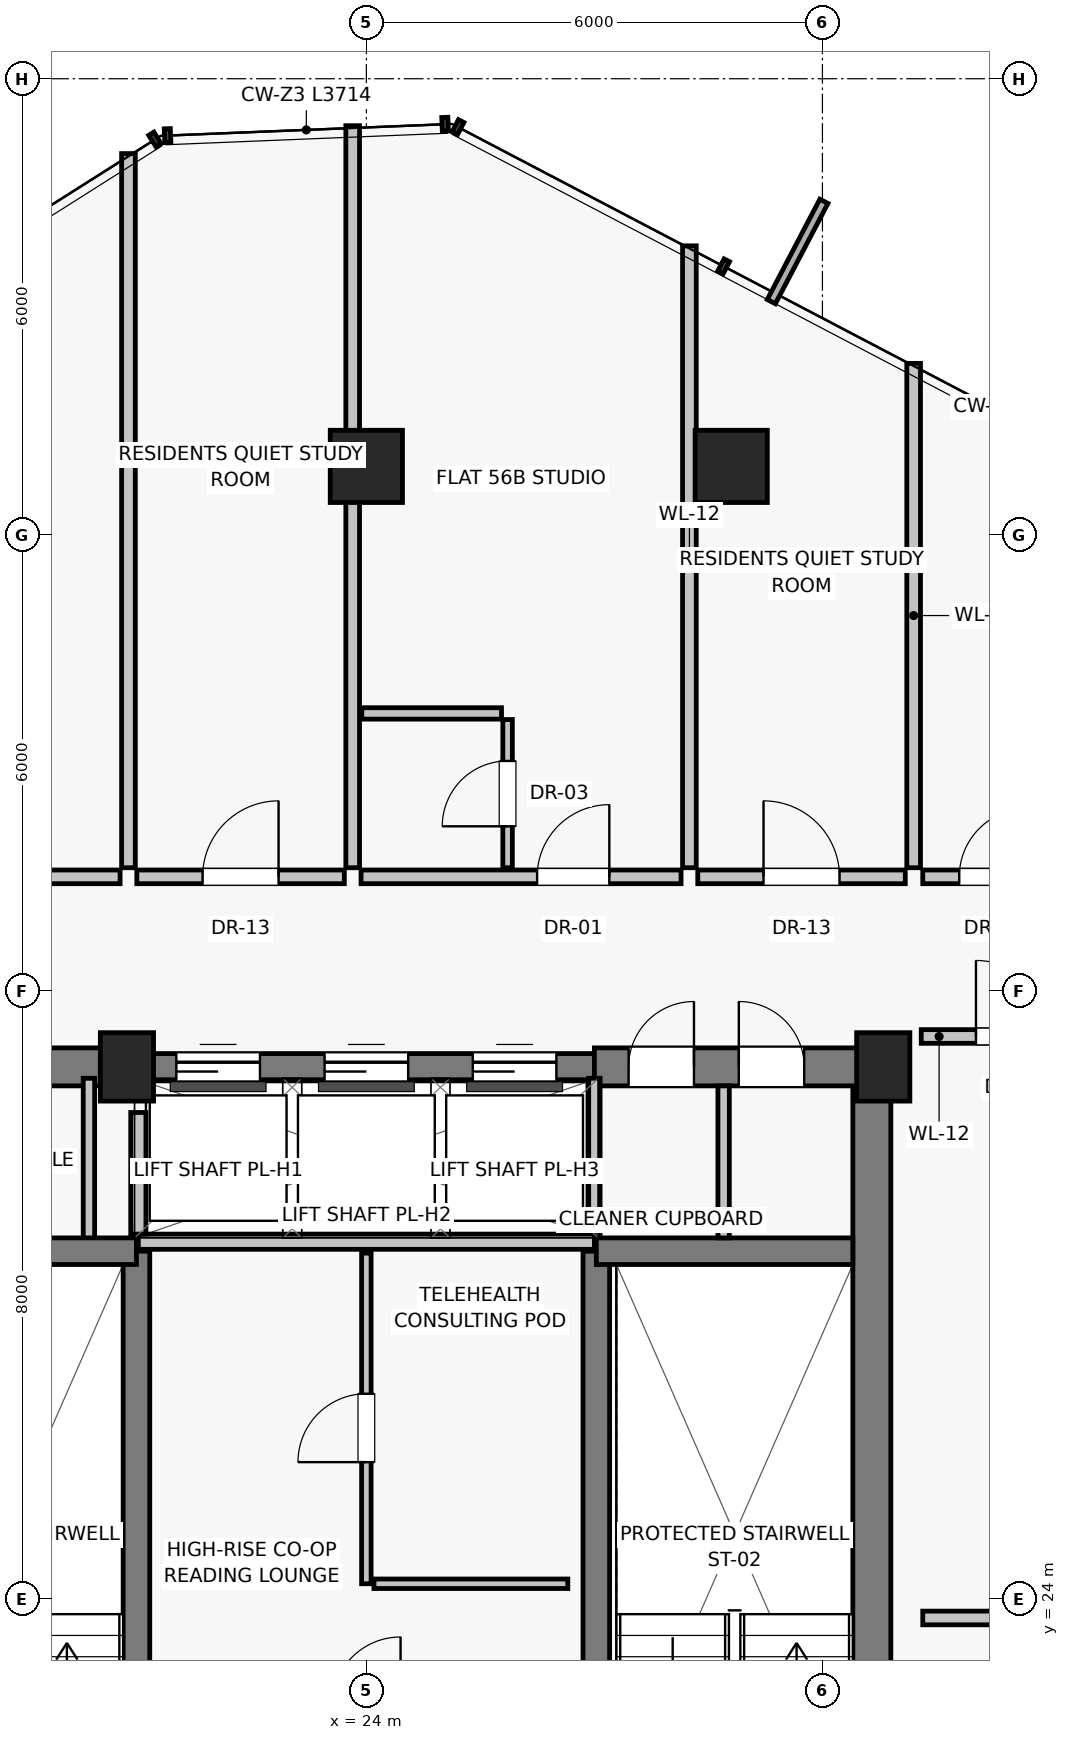
"""IFC4 building model, lengths in metres.
Left out: names, types, materials, properties, quantities, classifications, styles, units other than length and angle.
Written with IfcOpenShell. Run it as: python <this file> out.ifc"""

import sys

from ifc_helpers import new_model, si_unit, direction, frame, frame_2d, origin, origin_2d, place, context, subcontext, project, spatial, rectangle, extrude, source, transform, mapped, element, fill, save


model = new_model("IFC4")
c1 = context("Model", 3, precision=1e-05, world=origin(), true_north=direction((0.0, 1.0)))
c2 = subcontext(c1, "Body", "Model", "MODEL_VIEW")
j1 = project(units=[si_unit("LENGTHUNIT", "METRE"), si_unit("PLANEANGLEUNIT", "RADIAN")], contexts=[c1])
p1 = place(None, origin())
s1 = spatial("IfcSite", under=j1, at=p1, CompositionType="ELEMENT")
p2 = place(p1, origin())
s2 = spatial("IfcBuilding", under=s1, at=p2, CompositionType="ELEMENT")
p3 = place(p2, frame((0.0, 0.0, 198.35)))
s3 = spatial("IfcBuildingStorey", under=s2, at=p3, CompositionType="ELEMENT", Elevation=198.35)
for number, where, z_axis, x_axis in (
    (1, (20.85, 31.0, 0.0), (0.0, 0.0, 1.0), (1.0, 0.0, 0.0)),
    (2, (30.8, 31.0, 0.0), (0.0, 0.0, 1.0), (1.0, 0.0, 0.0)),
):
    element("IfcColumn", number, at=place(p3, frame(where, z_axis=z_axis, x_axis=x_axis)), inside=s3, PredefinedType="PILASTER", context=c2, shape_type="SweptSolid", body=[
        extrude(rectangle(XDim=0.7, YDim=0.9, at=origin_2d()), origin(), (0.0, 0.0, 1.0), 3.25),
    ])
for number, where, z_axis, x_axis in (
    (3, (28.8, 38.9, 0.0), (0.0, 0.0, 1.0), (1.0, 0.0, 0.0)),
    (4, (24.0, 38.9, 0.0), (0.0, 0.0, 1.0), (1.0, 0.0, 0.0)),
):
    element("IfcColumn", number, at=place(p3, frame(where, z_axis=z_axis, x_axis=x_axis)), inside=s3, PredefinedType="COLUMN", context=c2, shape_type="SweptSolid", body=[
        extrude(rectangle(XDim=0.95, YDim=0.95, at=origin_2d()), origin(), (0.0, 0.0, 1.0), 3.25),
    ])
p4 = place(p3, frame((30.65, 16.8, 0.0), z_axis=(0.0, 0.0, 1.0), x_axis=(0.0, 1.0, 0.0)))
e5 = element("IfcWall", 5, at=p4, inside=s3, PredefinedType="SHEAR", context=c2, shape_type="SweptSolid", body=[
    extrude(rectangle(XDim=14.2, YDim=0.5, at=frame_2d((7.1, 0.0))), origin(), (0.0, 0.0, 1.0), 3.015),
])
p5 = place(p3, frame((17.2, 31.0, 0.0), z_axis=(0.0, 0.0, 1.0), x_axis=(1.0, 0.0, 0.0)))
e6 = element("IfcWall", 6, at=p5, inside=s3, PredefinedType="SHEAR", context=c2, shape_type="SweptSolid", body=[
    extrude(rectangle(XDim=3.8, YDim=0.5, at=frame_2d((1.9, 0.0))), origin(), (0.0, 0.0, 1.0), 3.015),
])
p6 = place(p5, frame((1.25, 0.0, 0.0)))
e7 = element("IfcOpeningElement", 7, at=p6, cuts=e6, PredefinedType="OPENING", context=c2, shape_type="SweptSolid", body=[
    extrude(rectangle(XDim=0.86, YDim=2.01, at=frame_2d((0.43, 1.005))), frame((0.0, 0.26, 0.0), z_axis=(0.0, -1.0, 0.0), x_axis=(1.0, 0.0, 0.0)), (0.0, 0.0, 1.0), 0.52),
])
p7 = place(p3, frame((21.0, 31.0, 0.0), z_axis=(0.0, 0.0, 1.0), x_axis=(1.0, 0.0, 0.0)))
e8 = element("IfcWall", 8, at=p7, inside=s3, PredefinedType="SHEAR", context=c2, shape_type="SweptSolid", body=[
    extrude(rectangle(XDim=6.0, YDim=0.35, at=frame_2d((3.0, 0.0))), origin(), (0.0, 0.0, 1.0), 3.015),
])
p8 = place(p7, frame((0.5, 0.0, 0.0)))
e9 = element("IfcOpeningElement", 9, at=p8, cuts=e8, PredefinedType="OPENING", context=c2, shape_type="SweptSolid", body=[
    extrude(rectangle(XDim=1.1, YDim=2.08, at=frame_2d((0.55, 1.04))), frame((0.0, 0.185, 0.0), z_axis=(0.0, -1.0, 0.0), x_axis=(1.0, 0.0, 0.0)), (0.0, 0.0, 1.0), 0.37),
])
p9 = place(p7, frame((2.45, 0.0, 0.0)))
e10 = element("IfcOpeningElement", 10, at=p9, cuts=e8, PredefinedType="OPENING", context=c2, shape_type="SweptSolid", body=[
    extrude(rectangle(XDim=1.1, YDim=2.08, at=frame_2d((0.55, 1.04))), frame((0.0, 0.185, 0.0), z_axis=(0.0, -1.0, 0.0), x_axis=(1.0, 0.0, 0.0)), (0.0, 0.0, 1.0), 0.37),
])
p10 = place(p7, frame((4.4, 0.0, 0.0)))
e11 = element("IfcOpeningElement", 11, at=p10, cuts=e8, PredefinedType="OPENING", context=c2, shape_type="SweptSolid", body=[
    extrude(rectangle(XDim=1.1, YDim=2.08, at=frame_2d((0.55, 1.04))), frame((0.0, 0.185, 0.0), z_axis=(0.0, -1.0, 0.0), x_axis=(1.0, 0.0, 0.0)), (0.0, 0.0, 1.0), 0.37),
])
p11 = place(p3, frame((27.0, 31.0, 0.0), z_axis=(0.0, 0.0, 1.0), x_axis=(1.0, 0.0, 0.0)))
e12 = element("IfcWall", 12, at=p11, inside=s3, PredefinedType="SHEAR", context=c2, shape_type="SweptSolid", body=[
    extrude(rectangle(XDim=3.8, YDim=0.5, at=frame_2d((1.9, 0.0))), origin(), (0.0, 0.0, 1.0), 3.015),
])
p12 = place(p11, frame((0.45, 0.0, 0.0)))
e13 = element("IfcOpeningElement", 13, at=p12, cuts=e12, PredefinedType="OPENING", context=c2, shape_type="SweptSolid", body=[
    extrude(rectangle(XDim=0.86, YDim=2.01, at=frame_2d((0.43, 1.005))), frame((0.0, 0.26, 0.0), z_axis=(0.0, -1.0, 0.0), x_axis=(1.0, 0.0, 0.0)), (0.0, 0.0, 1.0), 0.52),
])
p13 = place(p11, frame((1.9, 0.0, 0.0)))
e14 = element("IfcOpeningElement", 14, at=p13, cuts=e12, PredefinedType="OPENING", context=c2, shape_type="SweptSolid", body=[
    extrude(rectangle(XDim=0.86, YDim=2.01, at=frame_2d((0.43, 1.005))), frame((0.0, 0.26, 0.0), z_axis=(0.0, -1.0, 0.0), x_axis=(1.0, 0.0, 0.0)), (0.0, 0.0, 1.0), 0.52),
])
for number, where, z_axis, x_axis in (
    (15, (20.35, 28.65, 0.0), (0.0, 0.0, 1.0), (0.0, 1.0, 0.0)),
    (16, (27.0, 28.65, 0.0), (0.0, 0.0, 1.0), (0.0, 1.0, 0.0)),
):
    element("IfcWall", number, at=place(p3, frame(where, z_axis=z_axis, x_axis=x_axis)), inside=s3, PredefinedType="PARTITIONING", context=c2, shape_type="SweptSolid", body=[
        extrude(rectangle(XDim=2.2, YDim=0.15, at=frame_2d((1.1, 0.0))), origin(), (0.0, 0.0, 1.0), 3.015),
    ])
for number, where, z_axis, x_axis in (
    (17, (20.975, 19.8, 0.0), (0.0, 0.0, 1.0), (0.0, 1.0, 0.0)),
    (18, (27.025, 19.8, 0.0), (0.0, 0.0, 1.0), (0.0, 1.0, 0.0)),
):
    element("IfcWall", number, at=place(p3, frame(where, z_axis=z_axis, x_axis=x_axis)), inside=s3, PredefinedType="SHEAR", context=c2, shape_type="SweptSolid", body=[
        extrude(rectangle(XDim=8.775, YDim=0.35, at=frame_2d((4.387, 0.0))), origin(), (0.0, 0.0, 1.0), 3.015),
    ])
for number, where, z_axis, x_axis in (
    (19, (17.6, 28.575, 0.0), (0.0, 0.0, 1.0), (1.0, 0.0, 0.0)),
    (20, (27.025, 28.575, 0.0), (0.0, 0.0, 1.0), (1.0, 0.0, 0.0)),
):
    element("IfcWall", number, at=place(p3, frame(where, z_axis=z_axis, x_axis=x_axis)), inside=s3, PredefinedType="SHEAR", context=c2, shape_type="SweptSolid", body=[
        extrude(rectangle(XDim=3.375, YDim=0.35, at=frame_2d((1.688, 0.0))), origin(), (0.0, 0.0, 1.0), 3.015),
    ])
p14 = place(p3, frame((21.0, 28.7, 0.0), z_axis=(0.0, 0.0, 1.0), x_axis=(1.0, 0.0, 0.0)))
e21 = element("IfcWall", 21, at=p14, inside=s3, PredefinedType="SOLIDWALL", context=c2, shape_type="SweptSolid", body=[
    extrude(rectangle(XDim=6.0, YDim=0.2, at=frame_2d((3.0, 0.0))), origin(), (0.0, 0.0, 1.0), 3.015),
])
p15 = place(p3, frame((21.0, 28.8, 0.0), z_axis=(0.0, 0.0, 1.0), x_axis=(0.0, 1.0, 0.0)))
e22 = element("IfcWall", 22, at=p15, inside=s3, PredefinedType="SOLIDWALL", context=c2, shape_type="SweptSolid", body=[
    extrude(rectangle(XDim=1.6, YDim=0.2, at=frame_2d((0.8, 0.0))), origin(), (0.0, 0.0, 1.0), 3.015),
])
p16 = place(p3, frame((24.1, 24.2, 0.0), z_axis=(0.0, 0.0, 1.0), x_axis=(1.0, 0.0, 0.0)))
e23 = element("IfcWall", 23, at=p16, inside=s3, PredefinedType="PARTITIONING", context=c2, shape_type="SweptSolid", body=[
    extrude(rectangle(XDim=2.55, YDim=0.125, at=frame_2d((1.275, 0.0))), origin(), (0.0, 0.0, 1.0), 3.015),
])
p17 = place(p3, frame((24.0, 24.2, 0.0), z_axis=(0.0, 0.0, 1.0), x_axis=(0.0, 1.0, 0.0)))
e24 = element("IfcWall", 24, at=p17, inside=s3, PredefinedType="PARTITIONING", context=c2, shape_type="SweptSolid", body=[
    extrude(rectangle(XDim=4.35, YDim=0.125, at=frame_2d((2.175, 0.0))), origin(), (0.0, 0.0, 1.0), 3.015),
])
p18 = place(p17, frame((1.6, 0.0, 0.0)))
e25 = element("IfcOpeningElement", 25, at=p18, cuts=e24, PredefinedType="OPENING", context=c2, shape_type="SweptSolid", body=[
    extrude(rectangle(XDim=0.9, YDim=2.01, at=frame_2d((0.45, 1.005))), frame((0.0, 0.073, 0.0), z_axis=(0.0, -1.0, 0.0), x_axis=(1.0, 0.0, 0.0)), (0.0, 0.0, 1.0), 0.145),
])
p19 = place(p3, frame((28.7, 28.75, 0.0), z_axis=(0.0, 0.0, 1.0), x_axis=(0.0, 1.0, 0.0)))
e26 = element("IfcWall", 26, at=p19, inside=s3, PredefinedType="PARTITIONING", context=c2, shape_type="SweptSolid", body=[
    extrude(rectangle(XDim=2.0, YDim=0.15, at=frame_2d((1.0, 0.0))), origin(), (0.0, 0.0, 1.0), 3.015),
])
p20 = place(p3, frame((31.2, 33.62, 0.0), z_axis=(0.0, 0.0, 1.0), x_axis=(0.0, 1.0, 0.0)))
e27 = element("IfcWall", 27, at=p20, inside=s3, PredefinedType="PARTITIONING", context=c2, shape_type="SweptSolid", body=[
    extrude(rectangle(XDim=6.635, YDim=0.18, at=frame_2d((3.318, 0.0))), origin(), (0.0, 0.0, 1.0), 3.015),
])
p21 = place(p3, frame((20.98, 33.5, 0.0), z_axis=(0.0, 0.0, 1.0), x_axis=(1.0, 0.0, 0.0)))
e28 = element("IfcWall", 28, at=p21, inside=s3, PredefinedType="PARTITIONING", context=c2, shape_type="SweptSolid", body=[
    extrude(rectangle(XDim=2.73, YDim=0.18, at=frame_2d((1.365, 0.0))), origin(), (0.0, 0.0, 1.0), 3.015),
])
p22 = place(p21, frame((0.865, 0.0, 0.0)))
e29 = element("IfcOpeningElement", 29, at=p22, cuts=e28, PredefinedType="OPENING", context=c2, shape_type="SweptSolid", body=[
    extrude(rectangle(XDim=1.0, YDim=2.01, at=frame_2d((0.5, 1.005))), frame((0.0, 0.1, 0.0), z_axis=(0.0, -1.0, 0.0), x_axis=(1.0, 0.0, 0.0)), (0.0, 0.0, 1.0), 0.2),
])
p23 = place(p3, frame((20.87, 33.62, 0.0), z_axis=(0.0, 0.0, 1.0), x_axis=(0.0, 1.0, 0.0)))
e30 = element("IfcWall", 30, at=p23, inside=s3, PredefinedType="PARTITIONING", context=c2, shape_type="SweptSolid", body=[
    extrude(rectangle(XDim=9.395, YDim=0.18, at=frame_2d((4.698, 0.0))), origin(), (0.0, 0.0, 1.0), 3.015),
])
p24 = place(p3, frame((15.31, 33.5, 0.0), z_axis=(0.0, 0.0, 1.0), x_axis=(1.0, 0.0, 0.0)))
e31 = element("IfcWall", 31, at=p24, inside=s3, PredefinedType="PARTITIONING", context=c2, shape_type="SweptSolid", body=[
    extrude(rectangle(XDim=5.45, YDim=0.18, at=frame_2d((2.725, 0.0))), origin(), (0.0, 0.0, 1.0), 3.015),
])
p25 = place(p24, frame((3.234, 0.0, 0.0)))
e32 = element("IfcOpeningElement", 32, at=p25, cuts=e31, PredefinedType="OPENING", context=c2, shape_type="SweptSolid", body=[
    extrude(rectangle(XDim=0.95, YDim=2.02, at=frame_2d((0.475, 1.01))), frame((0.0, 0.1, 0.0), z_axis=(0.0, -1.0, 0.0), x_axis=(1.0, 0.0, 0.0)), (0.0, 0.0, 1.0), 0.2),
])
p26 = place(p3, frame((23.82, 33.62, 0.0), z_axis=(0.0, 0.0, 1.0), x_axis=(0.0, 1.0, 0.0)))
e33 = element("IfcWall", 33, at=p26, inside=s3, PredefinedType="PARTITIONING", context=c2, shape_type="SweptSolid", body=[
    extrude(rectangle(XDim=9.762, YDim=0.18, at=frame_2d((4.881, 0.0))), origin(), (0.0, 0.0, 1.0), 3.015),
])
p27 = place(p3, frame((28.36, 33.5, 0.0), z_axis=(0.0, 0.0, 1.0), x_axis=(1.0, 0.0, 0.0)))
e34 = element("IfcWall", 34, at=p27, inside=s3, PredefinedType="PARTITIONING", context=c2, shape_type="SweptSolid", body=[
    extrude(rectangle(XDim=2.73, YDim=0.18, at=frame_2d((1.365, 0.0))), origin(), (0.0, 0.0, 1.0), 3.015),
])
p28 = place(p27, frame((0.865, 0.0, 0.0)))
e35 = element("IfcOpeningElement", 35, at=p28, cuts=e34, PredefinedType="OPENING", context=c2, shape_type="SweptSolid", body=[
    extrude(rectangle(XDim=1.0, YDim=2.01, at=frame_2d((0.5, 1.005))), frame((0.0, 0.1, 0.0), z_axis=(0.0, -1.0, 0.0), x_axis=(1.0, 0.0, 0.0)), (0.0, 0.0, 1.0), 0.2),
])
p29 = place(p3, frame((28.25, 33.62, 0.0), z_axis=(0.0, 0.0, 1.0), x_axis=(0.0, 1.0, 0.0)))
e36 = element("IfcWall", 36, at=p29, inside=s3, PredefinedType="PARTITIONING", context=c2, shape_type="SweptSolid", body=[
    extrude(rectangle(XDim=8.182, YDim=0.18, at=frame_2d((4.091, 0.0))), origin(), (0.0, 0.0, 1.0), 2.469),
])
p30 = place(p3, frame((23.93, 33.5, 0.0), z_axis=(0.0, 0.0, 1.0), x_axis=(1.0, 0.0, 0.0)))
e37 = element("IfcWall", 37, at=p30, inside=s3, PredefinedType="PARTITIONING", context=c2, shape_type="SweptSolid", body=[
    extrude(rectangle(XDim=4.21, YDim=0.18, at=frame_2d((2.105, 0.0))), origin(), (0.0, 0.0, 1.0), 3.015),
])
p31 = place(p30, frame((2.316, 0.0, 0.0)))
e38 = element("IfcOpeningElement", 38, at=p31, cuts=e37, PredefinedType="OPENING", context=c2, shape_type="SweptSolid", body=[
    extrude(rectangle(XDim=0.95, YDim=2.02, at=frame_2d((0.475, 1.01))), frame((0.0, 0.1, 0.0), z_axis=(0.0, -1.0, 0.0), x_axis=(1.0, 0.0, 0.0)), (0.0, 0.0, 1.0), 0.2),
])
p32 = place(p3, frame((25.858, 33.62, 0.0), z_axis=(0.0, 0.0, 1.0), x_axis=(0.0, 1.0, 0.0)))
e39 = element("IfcWall", 39, at=p32, inside=s3, PredefinedType="PARTITIONING", context=c2, shape_type="SweptSolid", body=[
    extrude(rectangle(XDim=1.95, YDim=0.125, at=frame_2d((0.975, 0.0))), origin(), (0.0, 0.0, 1.0), 3.015),
])
p33 = place(p32, frame((0.545, 0.0, 0.0)))
e40 = element("IfcOpeningElement", 40, at=p33, cuts=e39, PredefinedType="OPENING", context=c2, shape_type="SweptSolid", body=[
    extrude(rectangle(XDim=0.86, YDim=2.01, at=frame_2d((0.43, 1.005))), frame((0.0, 0.073, 0.0), z_axis=(0.0, -1.0, 0.0), x_axis=(1.0, 0.0, 0.0)), (0.0, 0.0, 1.0), 0.145),
])
p34 = place(p3, frame((23.94, 35.65, 0.0), z_axis=(0.0, 0.0, 1.0), x_axis=(1.0, 0.0, 0.0)))
e41 = element("IfcWall", 41, at=p34, inside=s3, PredefinedType="PARTITIONING", context=c2, shape_type="SweptSolid", body=[
    extrude(rectangle(XDim=1.838, YDim=0.15, at=frame_2d((0.919, 0.0))), origin(), (0.0, 0.0, 1.0), 2.662),
])
p35 = place(p3, frame((31.32, 23.75, 0.0), z_axis=(0.0, 0.0, 1.0), x_axis=(1.0, 0.0, 0.0)))
e42 = element("IfcWall", 42, at=p35, inside=s3, PredefinedType="PARTITIONING", context=c2, shape_type="SweptSolid", body=[
    extrude(rectangle(XDim=10.445, YDim=0.18, at=frame_2d((5.223, 0.0))), origin(), (0.0, 0.0, 1.0), 3.015),
])
p36 = place(p3, frame((31.3, 31.4, 0.0), z_axis=(0.0, 0.0, 1.0), x_axis=(1.0, 0.0, 0.0)))
e43 = element("IfcWall", 43, at=p36, inside=s3, PredefinedType="PARTITIONING", context=c2, shape_type="SweptSolid", body=[
    extrude(rectangle(XDim=1.92, YDim=0.18, at=frame_2d((0.96, 0.0))), origin(), (0.0, 0.0, 1.0), 3.015),
])
p37 = place(p36, frame((0.72, 0.0, 0.0)))
e44 = element("IfcOpeningElement", 44, at=p37, cuts=e43, PredefinedType="OPENING", context=c2, shape_type="SweptSolid", body=[
    extrude(rectangle(XDim=1.0, YDim=2.01, at=frame_2d((0.5, 1.005))), frame((0.0, 0.1, 0.0), z_axis=(0.0, -1.0, 0.0), x_axis=(1.0, 0.0, 0.0)), (0.0, 0.0, 1.0), 0.2),
])
p38 = place(p3, frame((31.32, 33.5, 0.0), z_axis=(0.0, 0.0, 1.0), x_axis=(1.0, 0.0, 0.0)))
e45 = element("IfcWall", 45, at=p38, inside=s3, PredefinedType="PARTITIONING", context=c2, shape_type="SweptSolid", body=[
    extrude(rectangle(XDim=1.86, YDim=0.18, at=frame_2d((0.93, 0.0))), origin(), (0.0, 0.0, 1.0), 3.015),
])
p39 = place(p38, frame((0.48, 0.0, 0.0)))
e46 = element("IfcOpeningElement", 46, at=p39, cuts=e45, PredefinedType="OPENING", context=c2, shape_type="SweptSolid", body=[
    extrude(rectangle(XDim=0.9, YDim=2.01, at=frame_2d((0.45, 1.005))), frame((0.0, 0.1, 0.0), z_axis=(0.0, -1.0, 0.0), x_axis=(1.0, 0.0, 0.0)), (0.0, 0.0, 1.0), 0.2),
])
m1 = source(origin(), c2, "Body", "SweptSolid", [
    extrude(rectangle(XDim=1.1, YDim=2.08, at=frame_2d((0.55, 1.04))), frame((0.0, 0.025, 0.0), z_axis=(0.0, -1.0, 0.0), x_axis=(1.0, 0.0, 0.0)), (0.0, 0.0, 1.0), 0.05),
])
p40 = place(p8, origin())
e47 = element("IfcDoor", 47, at=p40, inside=s3, OperationType="SLIDING_TO_LEFT", PredefinedType="DOOR", context=c2, shape_type="MappedRepresentation", body=[
    mapped(m1, transform((0.0, 0.0, 0.0), scale=1.0)),
])
fill(e9, e47)
p41 = place(p9, origin())
e48 = element("IfcDoor", 48, at=p41, inside=s3, OperationType="SLIDING_TO_LEFT", PredefinedType="DOOR", context=c2, shape_type="MappedRepresentation", body=[
    mapped(m1, transform((0.0, 0.0, 0.0), scale=1.0)),
])
fill(e10, e48)
p42 = place(p10, origin())
e49 = element("IfcDoor", 49, at=p42, inside=s3, OperationType="SLIDING_TO_LEFT", PredefinedType="DOOR", context=c2, shape_type="MappedRepresentation", body=[
    mapped(m1, transform((0.0, 0.0, 0.0), scale=1.0)),
])
fill(e11, e49)
m2 = source(origin(), c2, "Body", "SweptSolid", [
    extrude(rectangle(XDim=0.86, YDim=2.01, at=frame_2d((0.43, 1.005))), frame((0.0, 0.025, 0.0), z_axis=(0.0, -1.0, 0.0), x_axis=(1.0, 0.0, 0.0)), (0.0, 0.0, 1.0), 0.05),
])
p43 = place(p12, origin())
e50 = element("IfcDoor", 50, at=p43, inside=s3, OperationType="SINGLE_SWING_RIGHT", PredefinedType="DOOR", context=c2, shape_type="MappedRepresentation", body=[
    mapped(m2, transform((0.0, 0.0, 0.0), scale=1.0)),
])
fill(e13, e50)
p44 = place(p13, origin())
e51 = element("IfcDoor", 51, at=p44, inside=s3, OperationType="SINGLE_SWING_LEFT", PredefinedType="DOOR", context=c2, shape_type="MappedRepresentation", body=[
    mapped(m2, transform((0.0, 0.0, 0.0), scale=1.0)),
])
fill(e14, e51)
m3 = source(origin(), c2, "Body", "SweptSolid", [
    extrude(rectangle(XDim=0.9, YDim=2.01, at=frame_2d((0.45, 1.005))), frame((0.0, 0.025, 0.0), z_axis=(0.0, -1.0, 0.0), x_axis=(1.0, 0.0, 0.0)), (0.0, 0.0, 1.0), 0.05),
])
p45 = place(p18, origin())
e52 = element("IfcDoor", 52, at=p45, inside=s3, OperationType="SINGLE_SWING_LEFT", PredefinedType="DOOR", context=c2, shape_type="MappedRepresentation", body=[
    mapped(m3, transform((0.0, 0.0, 0.0), scale=1.0)),
])
fill(e25, e52)
m4 = source(origin(), c2, "Body", "SweptSolid", [
    extrude(rectangle(XDim=1.0, YDim=2.01, at=frame_2d((0.5, 1.005))), frame((0.0, 0.025, 0.0), z_axis=(0.0, -1.0, 0.0), x_axis=(1.0, 0.0, 0.0)), (0.0, 0.0, 1.0), 0.05),
])
p46 = place(p22, origin())
e53 = element("IfcDoor", 53, at=p46, inside=s3, OperationType="SINGLE_SWING_RIGHT", PredefinedType="DOOR", context=c2, shape_type="MappedRepresentation", body=[
    mapped(m4, transform((0.0, 0.0, 0.0), scale=1.0)),
])
fill(e29, e53)
p47 = place(p28, origin())
e54 = element("IfcDoor", 54, at=p47, inside=s3, OperationType="SINGLE_SWING_LEFT", PredefinedType="DOOR", context=c2, shape_type="MappedRepresentation", body=[
    mapped(m4, transform((0.0, 0.0, 0.0), scale=1.0)),
])
fill(e35, e54)
m5 = source(origin(), c2, "Body", "SweptSolid", [
    extrude(rectangle(XDim=0.95, YDim=2.02, at=frame_2d((0.475, 1.01))), frame((0.0, 0.025, 0.0), z_axis=(0.0, -1.0, 0.0), x_axis=(1.0, 0.0, 0.0)), (0.0, 0.0, 1.0), 0.05),
])
p48 = place(p31, origin())
e55 = element("IfcDoor", 55, at=p48, inside=s3, OperationType="SINGLE_SWING_RIGHT", PredefinedType="DOOR", context=c2, shape_type="MappedRepresentation", body=[
    mapped(m5, transform((0.0, 0.0, 0.0), scale=1.0)),
])
fill(e38, e55)
p49 = place(p33, origin())
e56 = element("IfcDoor", 56, at=p49, inside=s3, OperationType="SINGLE_SWING_LEFT", PredefinedType="DOOR", context=c2, shape_type="MappedRepresentation", body=[
    mapped(m2, transform((0.0, 0.0, 0.0), scale=1.0)),
])
fill(e40, e56)
p50 = place(p37, origin())
e57 = element("IfcDoor", 57, at=p50, inside=s3, OperationType="SINGLE_SWING_LEFT", PredefinedType="DOOR", context=c2, shape_type="MappedRepresentation", body=[
    mapped(m4, transform((0.0, 0.0, 0.0), scale=1.0)),
])
fill(e44, e57)
p51 = place(p39, origin())
e58 = element("IfcDoor", 58, at=p51, inside=s3, OperationType="SINGLE_SWING_RIGHT", PredefinedType="DOOR", context=c2, shape_type="MappedRepresentation", body=[
    mapped(m3, transform((0.0, 0.0, 0.0), scale=1.0)),
])
fill(e46, e58)
save(model, sys.argv[1])
